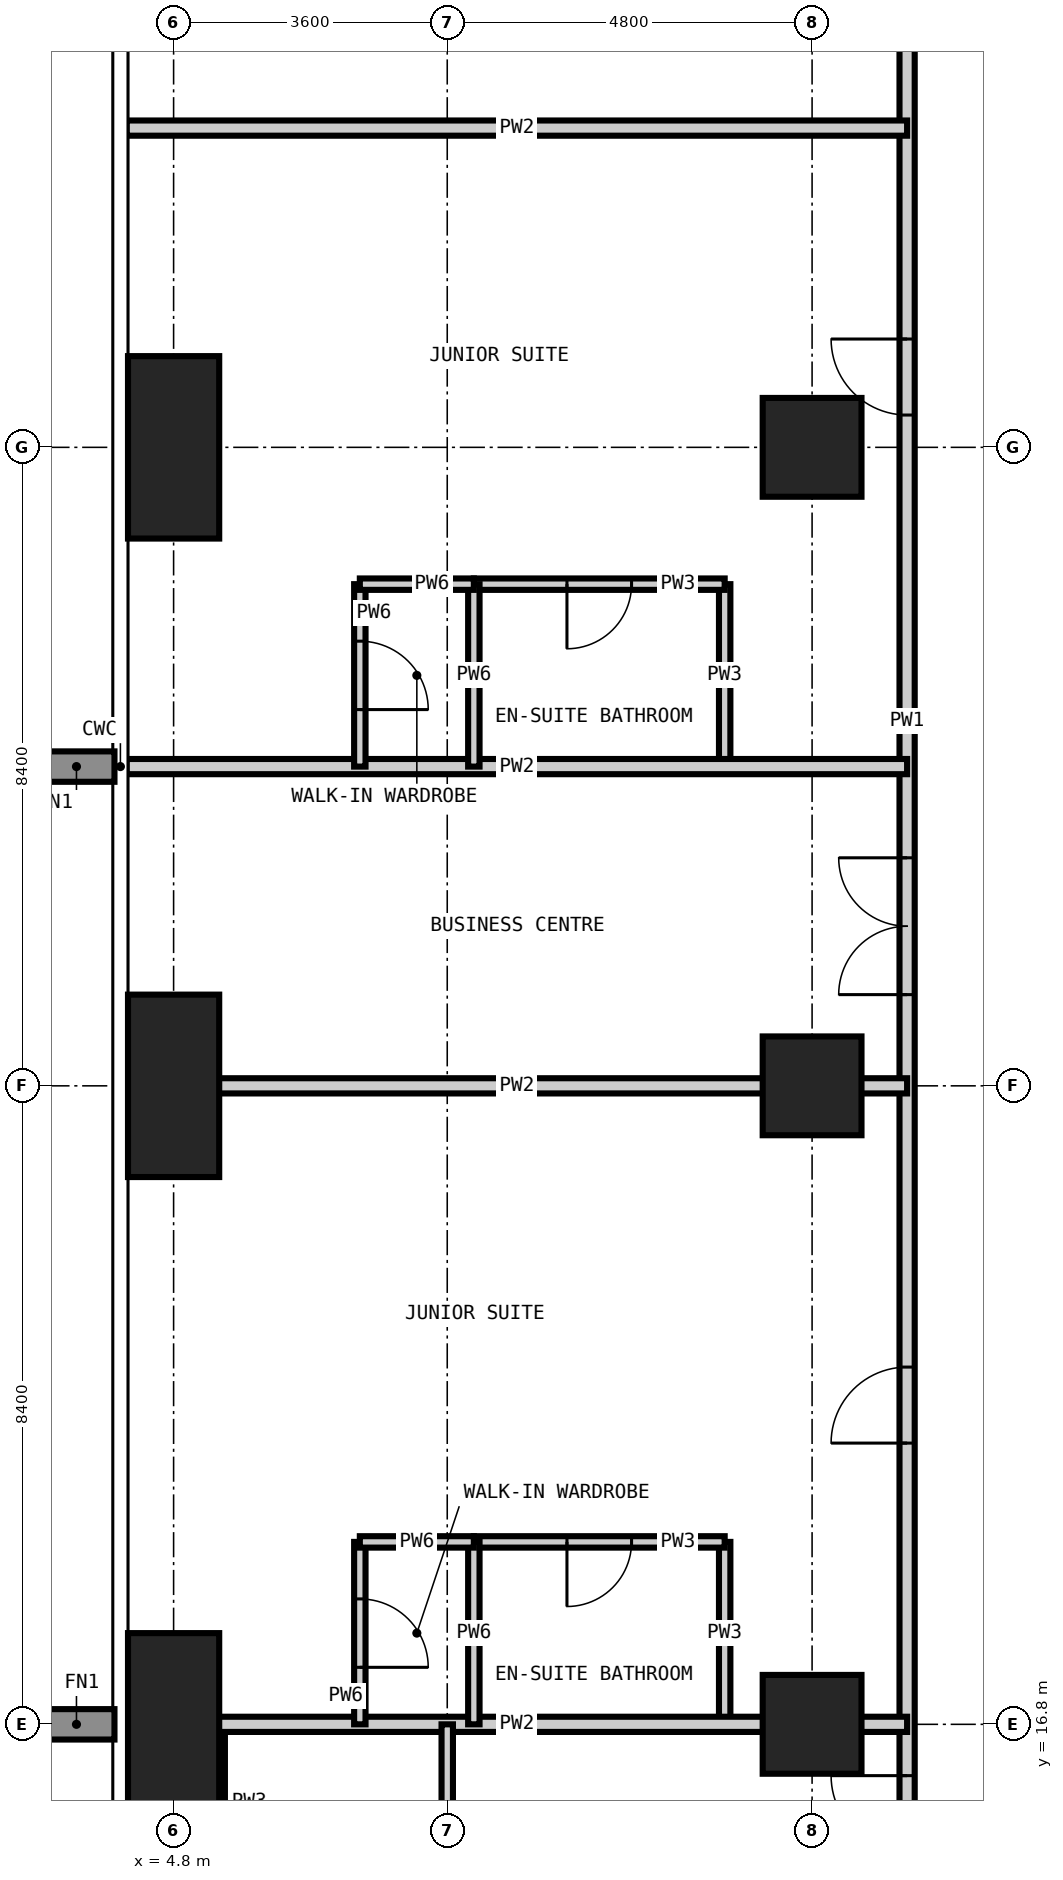
"""IFC4 building model, lengths in metres.
Left out: names, types, materials, properties, quantities, classifications, styles, units other than length and angle.
Written with IfcOpenShell. Run it as: python <this file> out.ifc"""

import sys

from ifc_helpers import new_model, si_unit, direction, frame, frame_2d, origin, origin_2d, place, context, subcontext, project, spatial, rectangle, extrude, element, fill, save


model = new_model("IFC4")
c1 = context("Model", 3, precision=1e-05, world=origin(), true_north=direction((0.0, 1.0)))
c2 = subcontext(c1, "Body", "Model", "MODEL_VIEW")
j1 = project(units=[si_unit("LENGTHUNIT", "METRE"), si_unit("PLANEANGLEUNIT", "RADIAN")], contexts=[c1])
p1 = place(None, origin())
s1 = spatial("IfcSite", under=j1, at=p1, CompositionType="ELEMENT")
p2 = place(p1, origin())
s2 = spatial("IfcBuilding", under=s1, at=p2, CompositionType="ELEMENT")
p3 = place(p2, frame((0.0, 0.0, 177.0)))
s3 = spatial("IfcBuildingStorey", under=s2, at=p3, CompositionType="ELEMENT", Elevation=177.0)
for number, where, z_axis, x_axis in (
    (1, (4.8, 16.8, -0.35), (0.0, 0.0, 1.0), (1.0, 0.0, 0.0)),
    (2, (4.8, 25.2, -0.35), (0.0, 0.0, 1.0), (1.0, 0.0, 0.0)),
    (3, (4.8, 33.6, -0.35), (0.0, 0.0, 1.0), (1.0, 0.0, 0.0)),
):
    element("IfcColumn", number, at=place(p3, frame(where, z_axis=z_axis, x_axis=x_axis)), inside=s3, PredefinedType="COLUMN", context=c2, shape_type="SweptSolid", body=[
        extrude(rectangle(XDim=1.2, YDim=2.4, at=origin_2d()), origin(), (0.0, 0.0, 1.0), 3.6),
    ])
for number, where, z_axis, x_axis in (
    (4, (13.2, 16.8, -0.35), (0.0, 0.0, 1.0), (1.0, 0.0, 0.0)),
    (5, (13.2, 25.2, -0.35), (0.0, 0.0, 1.0), (1.0, 0.0, 0.0)),
    (6, (13.2, 33.6, -0.35), (0.0, 0.0, 1.0), (1.0, 0.0, 0.0)),
):
    element("IfcColumn", number, at=place(p3, frame(where, z_axis=z_axis, x_axis=x_axis)), inside=s3, PredefinedType="COLUMN", context=c2, shape_type="SweptSolid", body=[
        extrude(rectangle(XDim=1.3, YDim=1.3, at=origin_2d()), origin(), (0.0, 0.0, 1.0), 3.6),
    ])
p4 = place(p3, frame((5.4, 13.2, 0.0), z_axis=(0.0, 0.0, 1.0), x_axis=(0.0, 1.0, 0.0)))
e7 = element("IfcWall", 7, at=p4, inside=s3, PredefinedType="PARTITIONING", context=c2, shape_type="SweptSolid", body=[
    extrude(rectangle(XDim=3.6, YDim=0.15, at=frame_2d((1.8, 0.0))), origin(), (0.0, 0.0, 1.0), 3.25),
])
p5 = place(p4, frame((1.375, 0.0, 0.0)))
e8 = element("IfcOpeningElement", 8, at=p5, cuts=e7, PredefinedType="OPENING", context=c2, shape_type="SweptSolid", body=[
    extrude(rectangle(XDim=0.85, YDim=2.1, at=frame_2d((0.425, 1.05))), frame((0.0, 0.085, 0.0), z_axis=(0.0, -1.0, 0.0), x_axis=(1.0, 0.0, 0.0)), (0.0, 0.0, 1.0), 0.17),
])
p6 = place(p3, frame((12.05, 16.8, 0.0), z_axis=(0.0, 0.0, 1.0), x_axis=(0.0, 1.0, 0.0)))
e9 = element("IfcWall", 9, at=p6, inside=s3, PredefinedType="PARTITIONING", context=c2, shape_type="SweptSolid", body=[
    extrude(rectangle(XDim=2.4, YDim=0.15, at=frame_2d((1.2, 0.0))), origin(), (0.0, 0.0, 1.0), 3.25),
])
p7 = place(p3, frame((12.05, 29.4, 0.0), z_axis=(0.0, 0.0, 1.0), x_axis=(0.0, 1.0, 0.0)))
e10 = element("IfcWall", 10, at=p7, inside=s3, PredefinedType="PARTITIONING", context=c2, shape_type="SweptSolid", body=[
    extrude(rectangle(XDim=2.4, YDim=0.15, at=frame_2d((1.2, 0.0))), origin(), (0.0, 0.0, 1.0), 3.25),
])
p8 = place(p3, frame((8.75, 19.2, 0.0), z_axis=(0.0, 0.0, 1.0), x_axis=(1.0, 0.0, 0.0)))
e11 = element("IfcWall", 11, at=p8, inside=s3, PredefinedType="PARTITIONING", context=c2, shape_type="SweptSolid", body=[
    extrude(rectangle(XDim=3.3, YDim=0.15, at=frame_2d((1.65, 0.0))), origin(), (0.0, 0.0, 1.0), 3.25),
])
p9 = place(p8, frame((1.225, 0.0, 0.0)))
e12 = element("IfcOpeningElement", 12, at=p9, cuts=e11, PredefinedType="OPENING", context=c2, shape_type="SweptSolid", body=[
    extrude(rectangle(XDim=0.85, YDim=2.1, at=frame_2d((0.425, 1.05))), frame((0.0, 0.085, 0.0), z_axis=(0.0, -1.0, 0.0), x_axis=(1.0, 0.0, 0.0)), (0.0, 0.0, 1.0), 0.17),
])
p10 = place(p3, frame((8.75, 31.8, 0.0), z_axis=(0.0, 0.0, 1.0), x_axis=(1.0, 0.0, 0.0)))
e13 = element("IfcWall", 13, at=p10, inside=s3, PredefinedType="PARTITIONING", context=c2, shape_type="SweptSolid", body=[
    extrude(rectangle(XDim=3.3, YDim=0.15, at=frame_2d((1.65, 0.0))), origin(), (0.0, 0.0, 1.0), 3.25),
])
p11 = place(p10, frame((1.225, 0.0, 0.0)))
e14 = element("IfcOpeningElement", 14, at=p11, cuts=e13, PredefinedType="OPENING", context=c2, shape_type="SweptSolid", body=[
    extrude(rectangle(XDim=0.85, YDim=2.1, at=frame_2d((0.425, 1.05))), frame((0.0, 0.085, 0.0), z_axis=(0.0, -1.0, 0.0), x_axis=(1.0, 0.0, 0.0)), (0.0, 0.0, 1.0), 0.17),
])
p12 = place(p3, frame((14.45, 14.45, 0.0), z_axis=(0.0, 0.0, 1.0), x_axis=(0.0, 1.0, 0.0)))
e15 = element("IfcWall", 15, at=p12, inside=s3, PredefinedType="PARTITIONING", context=c2, shape_type="SweptSolid", body=[
    extrude(rectangle(XDim=31.1, YDim=0.2, at=frame_2d((15.55, 0.0))), origin(), (0.0, 0.0, 1.0), 3.25),
])
p13 = place(p12, frame((6.05, 0.0, 0.0)))
e16 = element("IfcOpeningElement", 16, at=p13, cuts=e15, PredefinedType="OPENING", context=c2, shape_type="SweptSolid", body=[
    extrude(rectangle(XDim=1.0, YDim=2.2, at=frame_2d((0.5, 1.1))), frame((0.0, 0.11, 0.0), z_axis=(0.0, -1.0, 0.0), x_axis=(1.0, 0.0, 0.0)), (0.0, 0.0, 1.0), 0.22),
])
p14 = place(p12, frame((11.95, 0.0, 0.0)))
e17 = element("IfcOpeningElement", 17, at=p14, cuts=e15, PredefinedType="OPENING", context=c2, shape_type="SweptSolid", body=[
    extrude(rectangle(XDim=1.8, YDim=2.4, at=frame_2d((0.9, 1.2))), frame((0.0, 0.11, 0.0), z_axis=(0.0, -1.0, 0.0), x_axis=(1.0, 0.0, 0.0)), (0.0, 0.0, 1.0), 0.22),
])
p15 = place(p12, frame((19.575, 0.0, 0.0)))
e18 = element("IfcOpeningElement", 18, at=p15, cuts=e15, PredefinedType="OPENING", context=c2, shape_type="SweptSolid", body=[
    extrude(rectangle(XDim=1.0, YDim=2.2, at=frame_2d((0.5, 1.1))), frame((0.0, 0.11, 0.0), z_axis=(0.0, -1.0, 0.0), x_axis=(1.0, 0.0, 0.0)), (0.0, 0.0, 1.0), 0.22),
])
p16 = place(p12, frame((24.95, 0.0, 0.0)))
e19 = element("IfcOpeningElement", 19, at=p16, cuts=e15, PredefinedType="OPENING", context=c2, shape_type="SweptSolid", body=[
    extrude(rectangle(XDim=1.0, YDim=2.2, at=frame_2d((0.5, 1.1))), frame((0.0, 0.11, 0.0), z_axis=(0.0, -1.0, 0.0), x_axis=(1.0, 0.0, 0.0)), (0.0, 0.0, 1.0), 0.22),
])
p17 = place(p12, frame((0.675, 0.0, 0.0)))
e20 = element("IfcOpeningElement", 20, at=p17, cuts=e15, PredefinedType="OPENING", context=c2, shape_type="SweptSolid", body=[
    extrude(rectangle(XDim=1.0, YDim=2.2, at=frame_2d((0.5, 1.1))), frame((0.0, 0.11, 0.0), z_axis=(0.0, -1.0, 0.0), x_axis=(1.0, 0.0, 0.0)), (0.0, 0.0, 1.0), 0.22),
])
p18 = place(p12, frame((28.825, 0.0, 0.0)))
e21 = element("IfcOpeningElement", 21, at=p18, cuts=e15, PredefinedType="OPENING", context=c2, shape_type="SweptSolid", body=[
    extrude(rectangle(XDim=1.0, YDim=2.2, at=frame_2d((0.5, 1.1))), frame((0.0, 0.11, 0.0), z_axis=(0.0, -1.0, 0.0), x_axis=(1.0, 0.0, 0.0)), (0.0, 0.0, 1.0), 0.22),
])
for number, where, z_axis, x_axis in (
    (22, (4.182, 16.8, 0.0), (0.0, 0.0, 1.0), (1.0, 0.0, 0.0)),
    (23, (4.182, 25.2, 0.0), (0.0, 0.0, 1.0), (1.0, 0.0, 0.0)),
    (24, (4.182, 29.4, 0.0), (0.0, 0.0, 1.0), (1.0, 0.0, 0.0)),
    (25, (4.182, 37.8, 0.0), (0.0, 0.0, 1.0), (1.0, 0.0, 0.0)),
):
    element("IfcWall", number, at=place(p3, frame(where, z_axis=z_axis, x_axis=x_axis)), inside=s3, PredefinedType="PARTITIONING", context=c2, shape_type="SweptSolid", body=[
        extrude(rectangle(XDim=10.268, YDim=0.2, at=frame_2d((5.134, 0.0))), origin(), (0.0, 0.0, 1.0), 3.25),
    ])
p19 = place(p3, frame((7.25, 16.8, 0.0), z_axis=(0.0, 0.0, 1.0), x_axis=(0.0, 1.0, 0.0)))
e26 = element("IfcWall", 26, at=p19, inside=s3, PredefinedType="PARTITIONING", context=c2, shape_type="SweptSolid", body=[
    extrude(rectangle(XDim=2.4, YDim=0.15, at=frame_2d((1.2, 0.0))), origin(), (0.0, 0.0, 1.0), 3.25),
])
p20 = place(p19, frame((0.75, 0.0, 0.0)))
e27 = element("IfcOpeningElement", 27, at=p20, cuts=e26, PredefinedType="OPENING", context=c2, shape_type="SweptSolid", body=[
    extrude(rectangle(XDim=0.9, YDim=2.1, at=frame_2d((0.45, 1.05))), frame((0.0, 0.085, 0.0), z_axis=(0.0, -1.0, 0.0), x_axis=(1.0, 0.0, 0.0)), (0.0, 0.0, 1.0), 0.17),
])
p21 = place(p3, frame((7.25, 29.4, 0.0), z_axis=(0.0, 0.0, 1.0), x_axis=(0.0, 1.0, 0.0)))
e28 = element("IfcWall", 28, at=p21, inside=s3, PredefinedType="PARTITIONING", context=c2, shape_type="SweptSolid", body=[
    extrude(rectangle(XDim=2.4, YDim=0.15, at=frame_2d((1.2, 0.0))), origin(), (0.0, 0.0, 1.0), 3.25),
])
p22 = place(p21, frame((0.75, 0.0, 0.0)))
e29 = element("IfcOpeningElement", 29, at=p22, cuts=e28, PredefinedType="OPENING", context=c2, shape_type="SweptSolid", body=[
    extrude(rectangle(XDim=0.9, YDim=2.1, at=frame_2d((0.45, 1.05))), frame((0.0, 0.085, 0.0), z_axis=(0.0, -1.0, 0.0), x_axis=(1.0, 0.0, 0.0)), (0.0, 0.0, 1.0), 0.17),
])
p23 = place(p3, frame((8.4, 4.182, 0.0), z_axis=(0.0, 0.0, 1.0), x_axis=(0.0, 1.0, 0.0)))
e30 = element("IfcWall", 30, at=p23, inside=s3, PredefinedType="PARTITIONING", context=c2, shape_type="SweptSolid", body=[
    extrude(rectangle(XDim=12.618, YDim=0.15, at=frame_2d((6.309, 0.0))), origin(), (0.0, 0.0, 1.0), 3.25),
])
p24 = place(p23, frame((2.868, 0.0, 0.0)))
e31 = element("IfcOpeningElement", 31, at=p24, cuts=e30, PredefinedType="OPENING", context=c2, shape_type="SweptSolid", body=[
    extrude(rectangle(XDim=0.9, YDim=2.1, at=frame_2d((0.45, 1.05))), frame((0.0, 0.085, 0.0), z_axis=(0.0, -1.0, 0.0), x_axis=(1.0, 0.0, 0.0)), (0.0, 0.0, 1.0), 0.17),
])
p25 = place(p3, frame((8.75, 16.8, 0.0), z_axis=(0.0, 0.0, 1.0), x_axis=(0.0, 1.0, 0.0)))
e32 = element("IfcWall", 32, at=p25, inside=s3, PredefinedType="PARTITIONING", context=c2, shape_type="SweptSolid", body=[
    extrude(rectangle(XDim=2.4, YDim=0.15, at=frame_2d((1.2, 0.0))), origin(), (0.0, 0.0, 1.0), 3.25),
])
p26 = place(p3, frame((8.75, 29.4, 0.0), z_axis=(0.0, 0.0, 1.0), x_axis=(0.0, 1.0, 0.0)))
e33 = element("IfcWall", 33, at=p26, inside=s3, PredefinedType="PARTITIONING", context=c2, shape_type="SweptSolid", body=[
    extrude(rectangle(XDim=2.4, YDim=0.15, at=frame_2d((1.2, 0.0))), origin(), (0.0, 0.0, 1.0), 3.25),
])
for number, where, z_axis, x_axis in (
    (34, (7.25, 19.2, 0.0), (0.0, 0.0, 1.0), (1.0, 0.0, 0.0)),
    (35, (7.25, 31.8, 0.0), (0.0, 0.0, 1.0), (1.0, 0.0, 0.0)),
):
    element("IfcWall", number, at=place(p3, frame(where, z_axis=z_axis, x_axis=x_axis)), inside=s3, PredefinedType="PARTITIONING", context=c2, shape_type="SweptSolid", body=[
        extrude(rectangle(XDim=1.5, YDim=0.15, at=frame_2d((0.75, 0.0))), origin(), (0.0, 0.0, 1.0), 3.25),
    ])
p27 = place(p13, origin())
e36 = element("IfcDoor", 36, at=p27, inside=s3, OperationType="SINGLE_SWING_LEFT", PredefinedType="DOOR", context=c2, shape_type="SweptSolid", body=[
    extrude(rectangle(XDim=1.0, YDim=2.2, at=frame_2d((0.5, 1.1))), frame((0.0, 0.025, 0.0), z_axis=(0.0, -1.0, 0.0), x_axis=(1.0, 0.0, 0.0)), (0.0, 0.0, 1.0), 0.05),
])
fill(e16, e36)
p28 = place(p9, frame((0.85, 0.0, 0.0), z_axis=(0.0, 0.0, 1.0), x_axis=(-1.0, 0.0, 0.0)))
e37 = element("IfcDoor", 37, at=p28, inside=s3, OperationType="SINGLE_SWING_RIGHT", PredefinedType="DOOR", context=c2, shape_type="SweptSolid", body=[
    extrude(rectangle(XDim=0.85, YDim=2.1, at=frame_2d((0.425, 1.05))), frame((0.0, 0.025, 0.0), z_axis=(0.0, -1.0, 0.0), x_axis=(1.0, 0.0, 0.0)), (0.0, 0.0, 1.0), 0.05),
])
fill(e12, e37)
p29 = place(p20, frame((0.9, 0.0, 0.0), z_axis=(0.0, 0.0, 1.0), x_axis=(-1.0, 0.0, 0.0)))
e38 = element("IfcDoor", 38, at=p29, inside=s3, OperationType="SINGLE_SWING_RIGHT", PredefinedType="DOOR", context=c2, shape_type="SweptSolid", body=[
    extrude(rectangle(XDim=0.9, YDim=2.1, at=frame_2d((0.45, 1.05))), frame((0.0, 0.025, 0.0), z_axis=(0.0, -1.0, 0.0), x_axis=(1.0, 0.0, 0.0)), (0.0, 0.0, 1.0), 0.05),
])
fill(e27, e38)
p30 = place(p14, origin())
e39 = element("IfcDoor", 39, at=p30, inside=s3, OperationType="DOUBLE_DOOR_DOUBLE_SWING", PredefinedType="DOOR", context=c2, shape_type="SweptSolid", body=[
    extrude(rectangle(XDim=1.8, YDim=2.4, at=frame_2d((0.9, 1.2))), frame((0.0, 0.025, 0.0), z_axis=(0.0, -1.0, 0.0), x_axis=(1.0, 0.0, 0.0)), (0.0, 0.0, 1.0), 0.05),
])
fill(e17, e39)
p31 = place(p15, origin())
e40 = element("IfcDoor", 40, at=p31, inside=s3, OperationType="SINGLE_SWING_RIGHT", PredefinedType="DOOR", context=c2, shape_type="SweptSolid", body=[
    extrude(rectangle(XDim=1.0, YDim=2.2, at=frame_2d((0.5, 1.1))), frame((0.0, 0.025, 0.0), z_axis=(0.0, -1.0, 0.0), x_axis=(1.0, 0.0, 0.0)), (0.0, 0.0, 1.0), 0.05),
])
fill(e18, e40)
p32 = place(p11, frame((0.85, 0.0, 0.0), z_axis=(0.0, 0.0, 1.0), x_axis=(-1.0, 0.0, 0.0)))
e41 = element("IfcDoor", 41, at=p32, inside=s3, OperationType="SINGLE_SWING_RIGHT", PredefinedType="DOOR", context=c2, shape_type="SweptSolid", body=[
    extrude(rectangle(XDim=0.85, YDim=2.1, at=frame_2d((0.425, 1.05))), frame((0.0, 0.025, 0.0), z_axis=(0.0, -1.0, 0.0), x_axis=(1.0, 0.0, 0.0)), (0.0, 0.0, 1.0), 0.05),
])
fill(e14, e41)
p33 = place(p22, frame((0.9, 0.0, 0.0), z_axis=(0.0, 0.0, 1.0), x_axis=(-1.0, 0.0, 0.0)))
e42 = element("IfcDoor", 42, at=p33, inside=s3, OperationType="SINGLE_SWING_RIGHT", PredefinedType="DOOR", context=c2, shape_type="SweptSolid", body=[
    extrude(rectangle(XDim=0.9, YDim=2.1, at=frame_2d((0.45, 1.05))), frame((0.0, 0.025, 0.0), z_axis=(0.0, -1.0, 0.0), x_axis=(1.0, 0.0, 0.0)), (0.0, 0.0, 1.0), 0.05),
])
fill(e29, e42)
p34 = place(p17, origin())
e43 = element("IfcDoor", 43, at=p34, inside=s3, OperationType="SINGLE_SWING_RIGHT", PredefinedType="DOOR", context=c2, shape_type="SweptSolid", body=[
    extrude(rectangle(XDim=1.0, YDim=2.2, at=frame_2d((0.5, 1.1))), frame((0.0, 0.025, 0.0), z_axis=(0.0, -1.0, 0.0), x_axis=(1.0, 0.0, 0.0)), (0.0, 0.0, 1.0), 0.05),
])
fill(e20, e43)
save(model, sys.argv[1])
